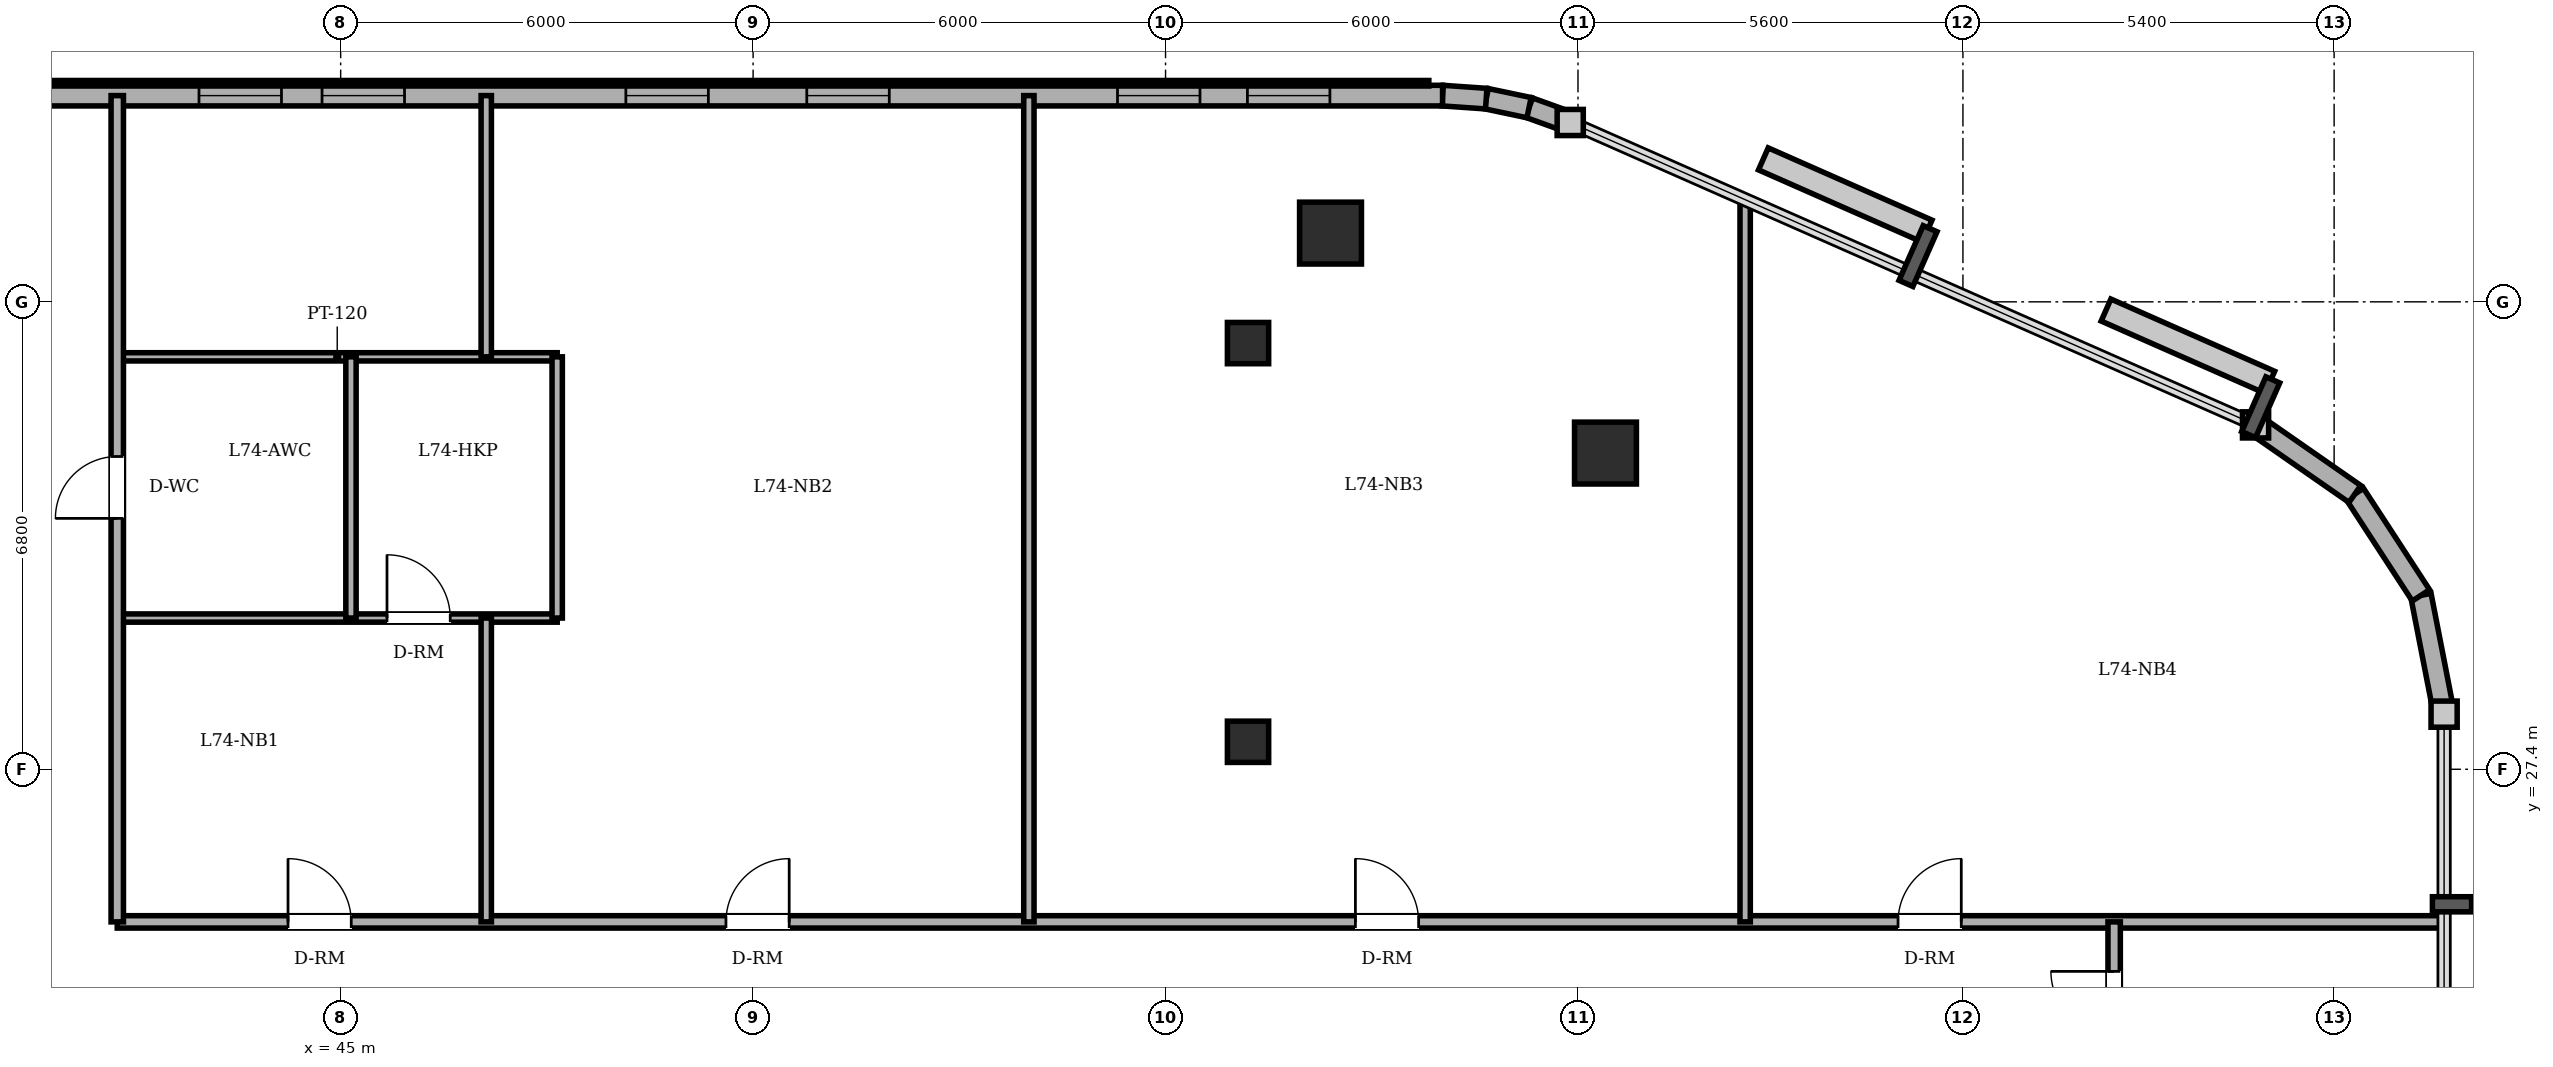
"""IFC4 building model, lengths in metres.
Left out: names, types, materials, properties, quantities, classifications, styles, units other than length and angle.
Written with IfcOpenShell. Run it as: python <this file> out.ifc"""

import sys

from ifc_helpers import new_model, si_unit, direction, frame, frame_2d, origin, origin_2d, place, context, subcontext, project, spatial, rectangle, circle, extrude, element, fill, save


model = new_model("IFC4")
c1 = context("Model", 3, precision=1e-05, world=origin(), true_north=direction((0.0, 1.0)))
c2 = subcontext(c1, "Body", "Model", "MODEL_VIEW")
j1 = project(units=[si_unit("LENGTHUNIT", "METRE"), si_unit("PLANEANGLEUNIT", "RADIAN")], contexts=[c1])
p1 = place(None, origin())
s1 = spatial("IfcSite", under=j1, at=p1, CompositionType="ELEMENT")
p2 = place(p1, origin())
s2 = spatial("IfcBuilding", under=s1, at=p2, CompositionType="ELEMENT")
p3 = place(p2, frame((0.0, 0.0, 284.35)))
s3 = spatial("IfcBuildingStorey", under=s2, at=p3, CompositionType="ELEMENT", Elevation=284.35)
for number, where, z_axis, x_axis in (
    (1, (63.4, 32.0, 0.0), (0.0, 0.0, 1.0), (1.0, 0.0, 0.0)),
    (2, (59.4, 35.2, 0.0), (0.0, 0.0, 1.0), (1.0, 0.0, 0.0)),
):
    element("IfcColumn", number, at=place(p3, frame(where, z_axis=z_axis, x_axis=x_axis)), inside=s3, PredefinedType="COLUMN", context=c2, shape_type="SweptSolid", body=[
        extrude(circle(Radius=0.45, at=origin_2d()), origin(), (0.0, 0.0, 1.0), 3.65),
    ])
for number, where, z_axis, x_axis in (
    (3, (58.2, 27.8, 0.0), (0.0, 0.0, 1.0), (1.0, 0.0, 0.0)),
    (4, (58.2, 33.6, 0.0), (0.0, 0.0, 1.0), (1.0, 0.0, 0.0)),
):
    element("IfcColumn", number, at=place(p3, frame(where, z_axis=z_axis, x_axis=x_axis)), inside=s3, PredefinedType="COLUMN", context=c2, shape_type="SweptSolid", body=[
        extrude(rectangle(XDim=0.6, YDim=0.6, at=origin_2d()), origin(), (0.0, 0.0, 1.0), 3.65),
    ])
for number, where, z_axis, x_axis in (
    (5, (75.6, 28.202, 0.0), (0.0, 0.0, 1.0), (-0.192, 0.981, 0.0)),
    (6, (75.263, 29.93, 0.0), (0.0, 0.0, 1.0), (-0.546, 0.838, 0.0)),
):
    element("IfcWall", number, at=place(p3, frame(where, z_axis=z_axis, x_axis=x_axis)), inside=s3, PredefinedType="SOLIDWALL", context=c2, shape_type="SweptSolid", body=[
        extrude(rectangle(XDim=1.76, YDim=0.3, at=frame_2d((0.88, 0.0))), origin(), (0.0, 0.0, 1.0), 3.45),
    ])
p4 = place(p3, frame((74.302, 31.405, 0.0), z_axis=(0.0, 0.0, 1.0), x_axis=(-0.821006966142, 0.570918174124, 0.0)))
e7 = element("IfcWall", 7, at=p4, inside=s3, PredefinedType="SOLIDWALL", context=c2, shape_type="SweptSolid", body=[
    extrude(rectangle(XDim=1.76, YDim=0.3, at=frame_2d((0.88, 0.0))), origin(), (0.0, 0.0, 1.0), 3.45),
])
p5 = place(p3, frame((62.887, 36.809, 0.0), z_axis=(0.0, 0.0, 1.0), x_axis=(-0.94077491148, 0.339031806665, 0.0)))
e8 = element("IfcWall", 8, at=p5, inside=s3, PredefinedType="SOLIDWALL", context=c2, shape_type="SweptSolid", body=[
    extrude(rectangle(XDim=0.636, YDim=0.3, at=frame_2d((0.318, 0.0))), origin(), (0.0, 0.0, 1.0), 3.45),
])
p6 = place(p3, frame((62.288, 37.025, 0.0), z_axis=(0.0, 0.0, 1.0), x_axis=(-0.97857012251, 0.205913854149, 0.0)))
e9 = element("IfcWall", 9, at=p6, inside=s3, PredefinedType="SOLIDWALL", context=c2, shape_type="SweptSolid", body=[
    extrude(rectangle(XDim=0.637, YDim=0.3, at=frame_2d((0.318, 0.0))), origin(), (0.0, 0.0, 1.0), 3.45),
])
p7 = place(p3, frame((61.665, 37.156, 0.0), z_axis=(0.0, 0.0, 1.0), x_axis=(-0.997613959688, 0.069039028352, 0.0)))
e10 = element("IfcWall", 10, at=p7, inside=s3, PredefinedType="SOLIDWALL", context=c2, shape_type="SweptSolid", body=[
    extrude(rectangle(XDim=0.636, YDim=0.3, at=frame_2d((0.318, 0.0))), origin(), (0.0, 0.0, 1.0), 3.45),
])
p8 = place(p3, frame((61.03, 37.2, 0.0), z_axis=(0.0, 0.0, 1.0), x_axis=(-1.0, 0.0, 0.0)))
e11 = element("IfcWall", 11, at=p8, inside=s3, PredefinedType="SOLIDWALL", context=c2, shape_type="SweptSolid", body=[
    extrude(rectangle(XDim=37.03, YDim=0.3, at=frame_2d((18.515, 0.0))), origin(), (0.0, 0.0, 1.0), 3.45),
])
p9 = place(p8, frame((28.105, 0.0, 0.0)))
e12 = element("IfcOpeningElement", 12, at=p9, cuts=e11, PredefinedType="OPENING", context=c2, shape_type="SweptSolid", body=[
    extrude(rectangle(XDim=0.95, YDim=2.2, at=frame_2d((0.475, 1.1))), frame((0.0, 0.16, 0.0), z_axis=(0.0, -1.0, 0.0), x_axis=(1.0, 0.0, 0.0)), (0.0, 0.0, 1.0), 0.32),
])
p10 = place(p8, frame((1.639, 0.0, 0.85)))
e13 = element("IfcOpeningElement", 13, at=p10, cuts=e11, PredefinedType="OPENING", context=c2, shape_type="SweptSolid", body=[
    extrude(rectangle(XDim=1.2, YDim=1.6, at=frame_2d((0.6, 0.8))), frame((0.0, 0.16, 0.0), z_axis=(0.0, -1.0, 0.0), x_axis=(1.0, 0.0, 0.0)), (0.0, 0.0, 1.0), 0.32),
])
p11 = place(p8, frame((3.529, 0.0, 0.85)))
e14 = element("IfcOpeningElement", 14, at=p11, cuts=e11, PredefinedType="OPENING", context=c2, shape_type="SweptSolid", body=[
    extrude(rectangle(XDim=1.2, YDim=1.6, at=frame_2d((0.6, 0.8))), frame((0.0, 0.16, 0.0), z_axis=(0.0, -1.0, 0.0), x_axis=(1.0, 0.0, 0.0)), (0.0, 0.0, 1.0), 0.32),
])
p12 = place(p8, frame((8.049, 0.0, 0.85)))
e15 = element("IfcOpeningElement", 15, at=p12, cuts=e11, PredefinedType="OPENING", context=c2, shape_type="SweptSolid", body=[
    extrude(rectangle(XDim=1.2, YDim=1.6, at=frame_2d((0.6, 0.8))), frame((0.0, 0.16, 0.0), z_axis=(0.0, -1.0, 0.0), x_axis=(1.0, 0.0, 0.0)), (0.0, 0.0, 1.0), 0.32),
])
p13 = place(p8, frame((10.681, 0.0, 0.85)))
e16 = element("IfcOpeningElement", 16, at=p13, cuts=e11, PredefinedType="OPENING", context=c2, shape_type="SweptSolid", body=[
    extrude(rectangle(XDim=1.2, YDim=1.6, at=frame_2d((0.6, 0.8))), frame((0.0, 0.16, 0.0), z_axis=(0.0, -1.0, 0.0), x_axis=(1.0, 0.0, 0.0)), (0.0, 0.0, 1.0), 0.32),
])
p14 = place(p8, frame((15.101, 0.0, 0.85)))
e17 = element("IfcOpeningElement", 17, at=p14, cuts=e11, PredefinedType="OPENING", context=c2, shape_type="SweptSolid", body=[
    extrude(rectangle(XDim=1.2, YDim=1.6, at=frame_2d((0.6, 0.8))), frame((0.0, 0.16, 0.0), z_axis=(0.0, -1.0, 0.0), x_axis=(1.0, 0.0, 0.0)), (0.0, 0.0, 1.0), 0.32),
])
p15 = place(p8, frame((16.891, 0.0, 0.85)))
e18 = element("IfcOpeningElement", 18, at=p15, cuts=e11, PredefinedType="OPENING", context=c2, shape_type="SweptSolid", body=[
    extrude(rectangle(XDim=1.2, YDim=1.6, at=frame_2d((0.6, 0.8))), frame((0.0, 0.16, 0.0), z_axis=(0.0, -1.0, 0.0), x_axis=(1.0, 0.0, 0.0)), (0.0, 0.0, 1.0), 0.32),
])
p16 = place(p8, frame((24.48, 0.0, 0.85)))
e19 = element("IfcOpeningElement", 19, at=p16, cuts=e11, PredefinedType="OPENING", context=c2, shape_type="SweptSolid", body=[
    extrude(rectangle(XDim=1.2, YDim=1.6, at=frame_2d((0.6, 0.8))), frame((0.0, 0.16, 0.0), z_axis=(0.0, -1.0, 0.0), x_axis=(1.0, 0.0, 0.0)), (0.0, 0.0, 1.0), 0.32),
])
p17 = place(p8, frame((30.28, 0.0, 0.85)))
e20 = element("IfcOpeningElement", 20, at=p17, cuts=e11, PredefinedType="OPENING", context=c2, shape_type="SweptSolid", body=[
    extrude(rectangle(XDim=1.2, YDim=1.6, at=frame_2d((0.6, 0.8))), frame((0.0, 0.16, 0.0), z_axis=(0.0, -1.0, 0.0), x_axis=(1.0, 0.0, 0.0)), (0.0, 0.0, 1.0), 0.32),
])
p18 = place(p3, frame((41.75, 25.18, 0.0), z_axis=(0.0, 0.0, 1.0), x_axis=(1.0, 0.0, 0.0)))
e21 = element("IfcWall", 21, at=p18, inside=s3, PredefinedType="PARTITIONING", context=c2, shape_type="SweptSolid", body=[
    extrude(rectangle(XDim=33.85, YDim=0.18, at=frame_2d((16.925, 0.0))), origin(), (0.0, 0.0, 1.0), 3.45),
])
p19 = place(p18, frame((2.484, 0.0, 0.0)))
e22 = element("IfcOpeningElement", 22, at=p19, cuts=e21, PredefinedType="OPENING", context=c2, shape_type="SweptSolid", body=[
    extrude(rectangle(XDim=0.92, YDim=2.1, at=frame_2d((0.46, 1.05))), frame((0.0, 0.1, 0.0), z_axis=(0.0, -1.0, 0.0), x_axis=(1.0, 0.0, 0.0)), (0.0, 0.0, 1.0), 0.2),
])
p20 = place(p18, frame((8.855, 0.0, 0.0)))
e23 = element("IfcOpeningElement", 23, at=p20, cuts=e21, PredefinedType="OPENING", context=c2, shape_type="SweptSolid", body=[
    extrude(rectangle(XDim=0.92, YDim=2.1, at=frame_2d((0.46, 1.05))), frame((0.0, 0.1, 0.0), z_axis=(0.0, -1.0, 0.0), x_axis=(1.0, 0.0, 0.0)), (0.0, 0.0, 1.0), 0.2),
])
p21 = place(p18, frame((18.012, 0.0, 0.0)))
e24 = element("IfcOpeningElement", 24, at=p21, cuts=e21, PredefinedType="OPENING", context=c2, shape_type="SweptSolid", body=[
    extrude(rectangle(XDim=0.92, YDim=2.1, at=frame_2d((0.46, 1.05))), frame((0.0, 0.1, 0.0), z_axis=(0.0, -1.0, 0.0), x_axis=(1.0, 0.0, 0.0)), (0.0, 0.0, 1.0), 0.2),
])
p22 = place(p18, frame((25.906, 0.0, 0.0)))
e25 = element("IfcOpeningElement", 25, at=p22, cuts=e21, PredefinedType="OPENING", context=c2, shape_type="SweptSolid", body=[
    extrude(rectangle(XDim=0.92, YDim=2.1, at=frame_2d((0.46, 1.05))), frame((0.0, 0.1, 0.0), z_axis=(0.0, -1.0, 0.0), x_axis=(1.0, 0.0, 0.0)), (0.0, 0.0, 1.0), 0.2),
])
p23 = place(p3, frame((41.75, 29.6, 0.0), z_axis=(0.0, 0.0, 1.0), x_axis=(1.0, 0.0, 0.0)))
e26 = element("IfcWall", 26, at=p23, inside=s3, PredefinedType="PARTITIONING", context=c2, shape_type="SweptSolid", body=[
    extrude(rectangle(XDim=6.4, YDim=0.12, at=frame_2d((3.2, 0.0))), origin(), (0.0, 0.0, 1.0), 3.132),
])
p24 = place(p23, frame((3.924, 0.0, 0.0)))
e27 = element("IfcOpeningElement", 27, at=p24, cuts=e26, PredefinedType="OPENING", context=c2, shape_type="SweptSolid", body=[
    extrude(rectangle(XDim=0.92, YDim=2.1, at=frame_2d((0.46, 1.05))), frame((0.0, 0.07, 0.0), z_axis=(0.0, -1.0, 0.0), x_axis=(1.0, 0.0, 0.0)), (0.0, 0.0, 1.0), 0.14),
])
p25 = place(p3, frame((41.75, 33.4, 0.0), z_axis=(0.0, 0.0, 1.0), x_axis=(1.0, 0.0, 0.0)))
e28 = element("IfcWall", 28, at=p25, inside=s3, PredefinedType="PARTITIONING", context=c2, shape_type="SweptSolid", body=[
    extrude(rectangle(XDim=6.4, YDim=0.12, at=frame_2d((3.2, 0.0))), origin(), (0.0, 0.0, 1.0), 3.092),
])
p26 = place(p3, frame((41.75, 25.18, 0.0), z_axis=(0.0, 0.0, 1.0), x_axis=(0.0, 1.0, 0.0)))
e29 = element("IfcWall", 29, at=p26, inside=s3, PredefinedType="PARTITIONING", context=c2, shape_type="SweptSolid", body=[
    extrude(rectangle(XDim=12.02, YDim=0.18, at=frame_2d((6.01, 0.0))), origin(), (0.0, 0.0, 1.0), 3.45),
])
p27 = place(p26, frame((5.87, 0.0, 0.0)))
e30 = element("IfcOpeningElement", 30, at=p27, cuts=e29, PredefinedType="OPENING", context=c2, shape_type="SweptSolid", body=[
    extrude(rectangle(XDim=0.9, YDim=2.1, at=frame_2d((0.45, 1.05))), frame((0.0, 0.1, 0.0), z_axis=(0.0, -1.0, 0.0), x_axis=(1.0, 0.0, 0.0)), (0.0, 0.0, 1.0), 0.2),
])
p28 = place(p3, frame((45.15, 29.6, 0.0), z_axis=(0.0, 0.0, 1.0), x_axis=(0.0, 1.0, 0.0)))
e31 = element("IfcWall", 31, at=p28, inside=s3, PredefinedType="PARTITIONING", context=c2, shape_type="SweptSolid", body=[
    extrude(rectangle(XDim=3.8, YDim=0.15, at=frame_2d((1.9, 0.0))), origin(), (0.0, 0.0, 1.0), 3.45),
])
p29 = place(p3, frame((47.118, 25.18, 0.0), z_axis=(0.0, 0.0, 1.0), x_axis=(0.0, 1.0, 0.0)))
e32 = element("IfcWall", 32, at=p29, inside=s3, PredefinedType="PARTITIONING", context=c2, shape_type="SweptSolid", body=[
    extrude(rectangle(XDim=4.42, YDim=0.15, at=frame_2d((2.21, 0.0))), origin(), (0.0, 0.0, 1.0), 3.45),
])
p30 = place(p3, frame((47.118, 33.4, 0.0), z_axis=(0.0, 0.0, 1.0), x_axis=(0.0, 1.0, 0.0)))
e33 = element("IfcWall", 33, at=p30, inside=s3, PredefinedType="PARTITIONING", context=c2, shape_type="SweptSolid", body=[
    extrude(rectangle(XDim=3.8, YDim=0.15, at=frame_2d((1.9, 0.0))), origin(), (0.0, 0.0, 1.0), 3.45),
])
p31 = place(p3, frame((48.15, 29.6, 0.0), z_axis=(0.0, 0.0, 1.0), x_axis=(0.0, 1.0, 0.0)))
e34 = element("IfcWall", 34, at=p31, inside=s3, PredefinedType="PARTITIONING", context=c2, shape_type="SweptSolid", body=[
    extrude(rectangle(XDim=3.8, YDim=0.15, at=frame_2d((1.9, 0.0))), origin(), (0.0, 0.0, 1.0), 3.45),
])
p32 = place(p3, frame((55.012, 25.18, 0.0), z_axis=(0.0, 0.0, 1.0), x_axis=(0.0, 1.0, 0.0)))
e35 = element("IfcWall", 35, at=p32, inside=s3, PredefinedType="PARTITIONING", context=c2, shape_type="SweptSolid", body=[
    extrude(rectangle(XDim=12.02, YDim=0.15, at=frame_2d((6.01, 0.0))), origin(), (0.0, 0.0, 1.0), 3.45),
])
p33 = place(p3, frame((65.432, 25.18, 0.0), z_axis=(0.0, 0.0, 1.0), x_axis=(0.0, 1.0, 0.0)))
e36 = element("IfcWall", 36, at=p33, inside=s3, PredefinedType="PARTITIONING", context=c2, shape_type="SweptSolid", body=[
    extrude(rectangle(XDim=10.506, YDim=0.15, at=frame_2d((5.253, 0.0))), origin(), (0.0, 0.0, 1.0), 3.45),
])
p34 = place(p3, frame((70.8, 22.82, 0.0), z_axis=(0.0, 0.0, 1.0), x_axis=(0.0, 1.0, 0.0)))
e37 = element("IfcWall", 37, at=p34, inside=s3, PredefinedType="PARTITIONING", context=c2, shape_type="SweptSolid", body=[
    extrude(rectangle(XDim=2.36, YDim=0.18, at=frame_2d((1.18, 0.0))), origin(), (0.0, 0.0, 1.0), 3.45),
])
p35 = place(p34, frame((0.72, 0.0, 0.0)))
e38 = element("IfcOpeningElement", 38, at=p35, cuts=e37, PredefinedType="OPENING", context=c2, shape_type="SweptSolid", body=[
    extrude(rectangle(XDim=0.92, YDim=2.1, at=frame_2d((0.46, 1.05))), frame((0.0, 0.1, 0.0), z_axis=(0.0, -1.0, 0.0), x_axis=(1.0, 0.0, 0.0)), (0.0, 0.0, 1.0), 0.2),
])
p36 = place(p10, origin())
e39 = element("IfcWindow", 39, at=p36, inside=s3, PartitioningType="SINGLE_PANEL", PredefinedType="WINDOW", context=c2, shape_type="SweptSolid", body=[
    extrude(rectangle(XDim=1.2, YDim=1.6, at=frame_2d((0.6, 0.8))), frame((0.0, 0.03, 0.0), z_axis=(0.0, -1.0, 0.0), x_axis=(1.0, 0.0, 0.0)), (0.0, 0.0, 1.0), 0.06),
])
fill(e13, e39)
p37 = place(p11, origin())
e40 = element("IfcWindow", 40, at=p37, inside=s3, PartitioningType="SINGLE_PANEL", PredefinedType="WINDOW", context=c2, shape_type="SweptSolid", body=[
    extrude(rectangle(XDim=1.2, YDim=1.6, at=frame_2d((0.6, 0.8))), frame((0.0, 0.03, 0.0), z_axis=(0.0, -1.0, 0.0), x_axis=(1.0, 0.0, 0.0)), (0.0, 0.0, 1.0), 0.06),
])
fill(e14, e40)
p38 = place(p12, origin())
e41 = element("IfcWindow", 41, at=p38, inside=s3, PartitioningType="SINGLE_PANEL", PredefinedType="WINDOW", context=c2, shape_type="SweptSolid", body=[
    extrude(rectangle(XDim=1.2, YDim=1.6, at=frame_2d((0.6, 0.8))), frame((0.0, 0.03, 0.0), z_axis=(0.0, -1.0, 0.0), x_axis=(1.0, 0.0, 0.0)), (0.0, 0.0, 1.0), 0.06),
])
fill(e15, e41)
p39 = place(p13, origin())
e42 = element("IfcWindow", 42, at=p39, inside=s3, PartitioningType="SINGLE_PANEL", PredefinedType="WINDOW", context=c2, shape_type="SweptSolid", body=[
    extrude(rectangle(XDim=1.2, YDim=1.6, at=frame_2d((0.6, 0.8))), frame((0.0, 0.03, 0.0), z_axis=(0.0, -1.0, 0.0), x_axis=(1.0, 0.0, 0.0)), (0.0, 0.0, 1.0), 0.06),
])
fill(e16, e42)
p40 = place(p14, origin())
e43 = element("IfcWindow", 43, at=p40, inside=s3, PartitioningType="SINGLE_PANEL", PredefinedType="WINDOW", context=c2, shape_type="SweptSolid", body=[
    extrude(rectangle(XDim=1.2, YDim=1.6, at=frame_2d((0.6, 0.8))), frame((0.0, 0.03, 0.0), z_axis=(0.0, -1.0, 0.0), x_axis=(1.0, 0.0, 0.0)), (0.0, 0.0, 1.0), 0.06),
])
fill(e17, e43)
p41 = place(p15, origin())
e44 = element("IfcWindow", 44, at=p41, inside=s3, PartitioningType="SINGLE_PANEL", PredefinedType="WINDOW", context=c2, shape_type="SweptSolid", body=[
    extrude(rectangle(XDim=1.2, YDim=1.6, at=frame_2d((0.6, 0.8))), frame((0.0, 0.03, 0.0), z_axis=(0.0, -1.0, 0.0), x_axis=(1.0, 0.0, 0.0)), (0.0, 0.0, 1.0), 0.06),
])
fill(e18, e44)
p42 = place(p27, origin())
e45 = element("IfcDoor", 45, at=p42, inside=s3, OperationType="SINGLE_SWING_LEFT", PredefinedType="DOOR", context=c2, shape_type="SweptSolid", body=[
    extrude(rectangle(XDim=0.9, YDim=2.1, at=frame_2d((0.45, 1.05))), frame((0.0, 0.025, 0.0), z_axis=(0.0, -1.0, 0.0), x_axis=(1.0, 0.0, 0.0)), (0.0, 0.0, 1.0), 0.05),
])
fill(e30, e45)
p43 = place(p19, origin())
e46 = element("IfcDoor", 46, at=p43, inside=s3, OperationType="SINGLE_SWING_LEFT", PredefinedType="DOOR", context=c2, shape_type="SweptSolid", body=[
    extrude(rectangle(XDim=0.92, YDim=2.1, at=frame_2d((0.46, 1.05))), frame((0.0, 0.025, 0.0), z_axis=(0.0, -1.0, 0.0), x_axis=(1.0, 0.0, 0.0)), (0.0, 0.0, 1.0), 0.05),
])
fill(e22, e46)
p44 = place(p20, origin())
e47 = element("IfcDoor", 47, at=p44, inside=s3, OperationType="SINGLE_SWING_RIGHT", PredefinedType="DOOR", context=c2, shape_type="SweptSolid", body=[
    extrude(rectangle(XDim=0.92, YDim=2.1, at=frame_2d((0.46, 1.05))), frame((0.0, 0.025, 0.0), z_axis=(0.0, -1.0, 0.0), x_axis=(1.0, 0.0, 0.0)), (0.0, 0.0, 1.0), 0.05),
])
fill(e23, e47)
p45 = place(p21, origin())
e48 = element("IfcDoor", 48, at=p45, inside=s3, OperationType="SINGLE_SWING_LEFT", PredefinedType="DOOR", context=c2, shape_type="SweptSolid", body=[
    extrude(rectangle(XDim=0.92, YDim=2.1, at=frame_2d((0.46, 1.05))), frame((0.0, 0.025, 0.0), z_axis=(0.0, -1.0, 0.0), x_axis=(1.0, 0.0, 0.0)), (0.0, 0.0, 1.0), 0.05),
])
fill(e24, e48)
p46 = place(p22, origin())
e49 = element("IfcDoor", 49, at=p46, inside=s3, OperationType="SINGLE_SWING_RIGHT", PredefinedType="DOOR", context=c2, shape_type="SweptSolid", body=[
    extrude(rectangle(XDim=0.92, YDim=2.1, at=frame_2d((0.46, 1.05))), frame((0.0, 0.025, 0.0), z_axis=(0.0, -1.0, 0.0), x_axis=(1.0, 0.0, 0.0)), (0.0, 0.0, 1.0), 0.05),
])
fill(e25, e49)
p47 = place(p35, origin())
e50 = element("IfcDoor", 50, at=p47, inside=s3, OperationType="SINGLE_SWING_RIGHT", PredefinedType="DOOR", context=c2, shape_type="SweptSolid", body=[
    extrude(rectangle(XDim=0.92, YDim=2.1, at=frame_2d((0.46, 1.05))), frame((0.0, 0.025, 0.0), z_axis=(0.0, -1.0, 0.0), x_axis=(1.0, 0.0, 0.0)), (0.0, 0.0, 1.0), 0.05),
])
fill(e38, e50)
p48 = place(p24, origin())
e51 = element("IfcDoor", 51, at=p48, inside=s3, OperationType="SINGLE_SWING_LEFT", PredefinedType="DOOR", context=c2, shape_type="SweptSolid", body=[
    extrude(rectangle(XDim=0.92, YDim=2.1, at=frame_2d((0.46, 1.05))), frame((0.0, 0.025, 0.0), z_axis=(0.0, -1.0, 0.0), x_axis=(1.0, 0.0, 0.0)), (0.0, 0.0, 1.0), 0.05),
])
fill(e27, e51)
save(model, sys.argv[1])
